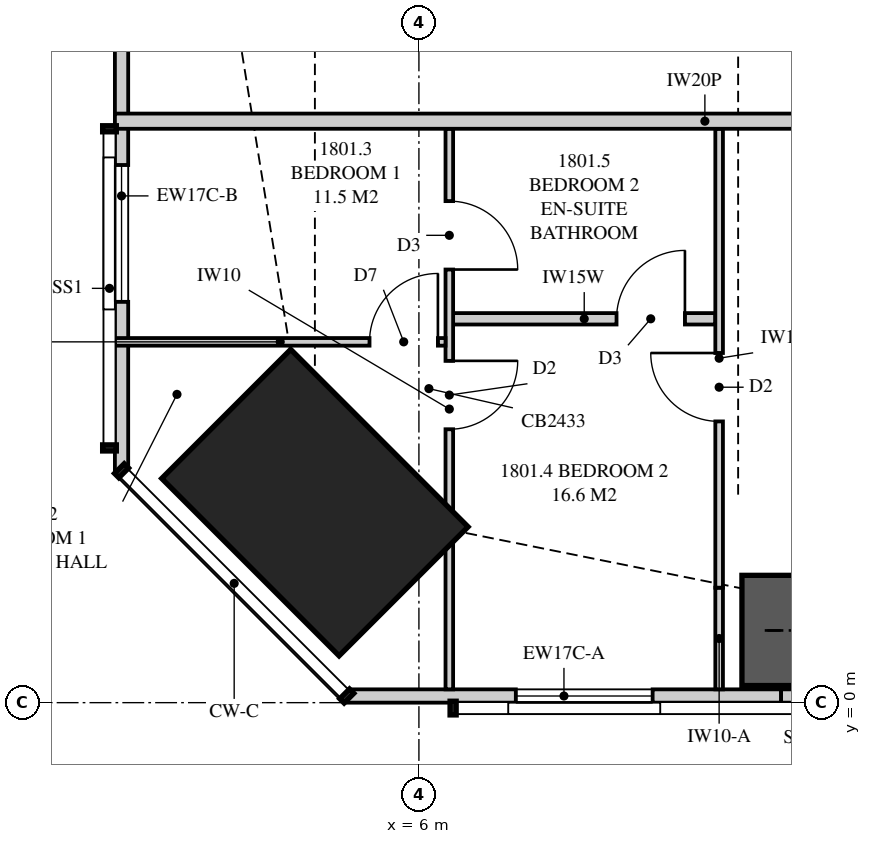
"""IFC4 building model, lengths in metres.
Left out: names, types, materials, properties, quantities, classifications, styles, units other than length and angle.
Written with IfcOpenShell. Run it as: python <this file> out.ifc"""

import sys

from ifc_helpers import new_model, si_unit, direction, frame, frame_2d, origin, origin_2d, place, context, subcontext, project, spatial, polyline, rectangle, hollow_rectangle, outline, extrude, element, fill, save


model = new_model("IFC4")
c1 = context("Model", 3, precision=1e-05, world=origin(), true_north=direction((0.0, 1.0)))
c2 = subcontext(c1, "Body", "Model", "MODEL_VIEW")
j1 = project(units=[si_unit("LENGTHUNIT", "METRE"), si_unit("PLANEANGLEUNIT", "RADIAN")], contexts=[c1])
p1 = place(None, origin())
s1 = spatial("IfcSite", under=j1, at=p1, CompositionType="ELEMENT")
p2 = place(p1, origin())
s2 = spatial("IfcBuilding", under=s1, at=p2, CompositionType="ELEMENT")
p3 = place(p2, frame((0.0, 0.0, 67.9)))
s3 = spatial("IfcBuildingStorey", under=s2, at=p3, CompositionType="ELEMENT", Elevation=67.9)
p4 = place(p3, frame((4.631, 2.631, 0.0), z_axis=(0.0, 0.0, 1.0), x_axis=(0.707106781187, 0.707106781187, 0.0)))
e1 = element("IfcColumn", 1, at=p4, inside=s3, PredefinedType="COLUMN", context=c2, shape_type="SweptSolid", body=[
    extrude(hollow_rectangle(XDim=2.4, YDim=3.3, WallThickness=0.125, at=origin_2d()), origin(), (0.0, 0.0, 1.0), 3.35),
])
p5 = place(p3, frame((5.051, 0.087, 0.0), z_axis=(0.0, 0.0, 1.0), x_axis=(1.0, 0.0, 0.0)))
e2 = element("IfcWall", 2, at=p5, inside=s3, PredefinedType="SOLIDWALL", context=c2, shape_type="SweptSolid", body=[
    extrude(rectangle(XDim=5.714, YDim=0.175, at=frame_2d((2.857, 0.0))), origin(), (0.0, 0.0, 1.0), 3.11),
])
p6 = place(p5, frame((2.224, 0.0, 0.4)))
e3 = element("IfcOpeningElement", 3, at=p6, cuts=e2, PredefinedType="OPENING", context=c2, shape_type="SweptSolid", body=[
    extrude(rectangle(XDim=1.8, YDim=1.7, at=frame_2d((0.9, 0.85))), frame((0.0, 0.097, 0.0), z_axis=(0.0, -1.0, 0.0), x_axis=(1.0, 0.0, 0.0)), (0.0, 0.0, 1.0), 0.195),
])
p7 = place(p3, frame((10.765, 0.087, 0.0), z_axis=(0.0, 0.0, 1.0), x_axis=(1.0, 0.0, 0.0)))
e4 = element("IfcWall", 4, at=p7, inside=s3, PredefinedType="SOLIDWALL", context=c2, shape_type="SweptSolid", body=[
    extrude(rectangle(XDim=6.71, YDim=0.175, at=frame_2d((3.355, 0.0))), origin(), (0.0, 0.0, 1.0), 2.15),
])
p8 = place(p7, frame((5.085, 0.0, 0.4)))
e5 = element("IfcOpeningElement", 5, at=p8, cuts=e4, PredefinedType="OPENING", context=c2, shape_type="SweptSolid", body=[
    extrude(rectangle(XDim=1.2, YDim=1.7, at=frame_2d((0.6, 0.85))), frame((0.0, 0.097, 0.0), z_axis=(0.0, -1.0, 0.0), x_axis=(1.0, 0.0, 0.0)), (0.0, 0.0, 1.0), 0.195),
])
p9 = place(p3, frame((2.087, 10.282, 0.0), z_axis=(0.0, 0.0, 1.0), x_axis=(0.0, -1.0, 0.0)))
e6 = element("IfcWall", 6, at=p9, inside=s3, PredefinedType="SOLIDWALL", context=c2, shape_type="SweptSolid", body=[
    extrude(rectangle(XDim=7.231, YDim=0.175, at=frame_2d((3.616, 0.0))), origin(), (0.0, 0.0, 1.0), 3.11),
])
p10 = place(p9, frame((0.239, 0.0, 0.4)))
e7 = element("IfcOpeningElement", 7, at=p10, cuts=e6, PredefinedType="OPENING", context=c2, shape_type="SweptSolid", body=[
    extrude(rectangle(XDim=1.2, YDim=1.7, at=frame_2d((0.6, 0.85))), frame((0.0, 0.097, 0.0), z_axis=(0.0, -1.0, 0.0), x_axis=(1.0, 0.0, 0.0)), (0.0, 0.0, 1.0), 0.195),
])
p11 = place(p9, frame((3.209, 0.0, 0.4)))
e8 = element("IfcOpeningElement", 8, at=p11, cuts=e6, PredefinedType="OPENING", context=c2, shape_type="SweptSolid", body=[
    extrude(rectangle(XDim=1.8, YDim=1.7, at=frame_2d((0.9, 0.85))), frame((0.0, 0.097, 0.0), z_axis=(0.0, -1.0, 0.0), x_axis=(1.0, 0.0, 0.0)), (0.0, 0.0, 1.0), 0.195),
])
p12 = place(p3, frame((6.4, 0.175, 0.0), z_axis=(0.0, 0.0, 1.0), x_axis=(0.0, 1.0, 0.0)))
e9 = element("IfcWall", 9, at=p12, inside=s3, PredefinedType="PARTITIONING", context=c2, shape_type="SweptSolid", body=[
    extrude(outline(polyline([(0.0, 0.0), (7.375, 0.0), (7.375, 3.11), (3.386, 3.11), (3.386, 2.15), (0.816, 2.15), (0.816, 3.11), (0.0, 3.11), (0.0, 0.0)])), frame((0.0, 0.05, 0.0), z_axis=(0.0, -1.0, 0.0), x_axis=(1.0, 0.0, 0.0)), (0.0, 0.0, 1.0), 0.1),
])
p13 = place(p12, frame((3.422, 0.0, 0.0)))
e10 = element("IfcOpeningElement", 10, at=p13, cuts=e9, PredefinedType="OPENING", context=c2, shape_type="SweptSolid", body=[
    extrude(rectangle(XDim=0.9, YDim=2.1, at=frame_2d((0.45, 1.05))), frame((0.0, 0.06, 0.0), z_axis=(0.0, -1.0, 0.0), x_axis=(1.0, 0.0, 0.0)), (0.0, 0.0, 1.0), 0.12),
])
p14 = place(p12, frame((5.523, 0.0, 0.0)))
e11 = element("IfcOpeningElement", 11, at=p14, cuts=e9, PredefinedType="OPENING", context=c2, shape_type="SweptSolid", body=[
    extrude(rectangle(XDim=0.9, YDim=2.1, at=frame_2d((0.45, 1.05))), frame((0.0, 0.06, 0.0), z_axis=(0.0, -1.0, 0.0), x_axis=(1.0, 0.0, 0.0)), (0.0, 0.0, 1.0), 0.12),
])
p15 = place(p3, frame((9.95, 0.175, 0.0), z_axis=(0.0, 0.0, 1.0), x_axis=(0.0, 1.0, 0.0)))
e12 = element("IfcWall", 12, at=p15, inside=s3, PredefinedType="PARTITIONING", context=c2, shape_type="SweptSolid", body=[
    extrude(outline(polyline([(0.0, 0.0), (1.338, 0.0), (1.338, 2.15), (0.103, 2.15), (0.103, 3.11), (0.0, 3.11), (0.0, 0.0)])), frame((0.0, 0.05, 0.0), z_axis=(0.0, -1.0, 0.0), x_axis=(1.0, 0.0, 0.0)), (0.0, 0.0, 1.0), 0.1),
])
p16 = place(p3, frame((9.95, 1.513, 0.0), z_axis=(0.0, 0.0, 1.0), x_axis=(0.0, 1.0, 0.0)))
e13 = element("IfcWall", 13, at=p16, inside=s3, PredefinedType="PARTITIONING", context=c2, shape_type="SweptSolid", body=[
    extrude(outline(polyline([(0.0, 0.0), (6.037, 0.0), (6.037, 2.51), (1.335, 2.51), (1.335, 2.15), (0.0, 2.15), (0.0, 0.0)])), frame((0.0, 0.05, 0.0), z_axis=(0.0, -1.0, 0.0), x_axis=(1.0, 0.0, 0.0)), (0.0, 0.0, 1.0), 0.1),
])
p17 = place(p16, frame((2.188, 0.0, 0.0)))
e14 = element("IfcOpeningElement", 14, at=p17, cuts=e13, PredefinedType="OPENING", context=c2, shape_type="SweptSolid", body=[
    extrude(rectangle(XDim=0.9, YDim=2.1, at=frame_2d((0.45, 1.05))), frame((0.0, 0.06, 0.0), z_axis=(0.0, -1.0, 0.0), x_axis=(1.0, 0.0, 0.0)), (0.0, 0.0, 1.0), 0.12),
])
p18 = place(p3, frame((2.0, 4.747, 0.0), z_axis=(0.0, 0.0, 1.0), x_axis=(1.0, 0.0, 0.0)))
e15 = element("IfcWall", 15, at=p18, inside=s3, PredefinedType="PARTITIONING", context=c2, shape_type="SweptSolid", body=[
    extrude(outline(polyline([(0.0, 0.0), (4.35, 0.0), (4.35, 3.11), (3.565, 3.11), (3.565, 2.15), (1.012, 2.15), (1.012, 3.11), (0.0, 3.11), (0.0, 0.0)])), frame((0.0, 0.05, 0.0), z_axis=(0.0, -1.0, 0.0), x_axis=(1.0, 0.0, 0.0)), (0.0, 0.0, 1.0), 0.1),
])
p19 = place(p18, frame((3.35, 0.0, 0.0)))
e16 = element("IfcOpeningElement", 16, at=p19, cuts=e15, PredefinedType="OPENING", context=c2, shape_type="SweptSolid", body=[
    extrude(rectangle(XDim=0.9, YDim=2.1, at=frame_2d((0.45, 1.05))), frame((0.0, 0.06, 0.0), z_axis=(0.0, -1.0, 0.0), x_axis=(1.0, 0.0, 0.0)), (0.0, 0.0, 1.0), 0.12),
])
p20 = place(p3, frame((6.45, 5.05, 0.0), z_axis=(0.0, 0.0, 1.0), x_axis=(1.0, 0.0, 0.0)))
e17 = element("IfcWall", 17, at=p20, inside=s3, PredefinedType="PLUMBINGWALL", context=c2, shape_type="SweptSolid", body=[
    extrude(outline(polyline([(0.0, 0.0), (3.45, 0.0), (3.45, 3.11), (3.45, 2.51), (2.465, 2.51), (2.465, 3.11), (0.0, 3.11), (0.0, 0.0)])), frame((0.0, 0.075, 0.0), z_axis=(0.0, -1.0, 0.0), x_axis=(1.0, 0.0, 0.0)), (0.0, 0.0, 1.0), 0.15),
])
p21 = place(p20, frame((2.15, 0.0, 0.0)))
e18 = element("IfcOpeningElement", 18, at=p21, cuts=e17, PredefinedType="OPENING", context=c2, shape_type="SweptSolid", body=[
    extrude(rectangle(XDim=0.9, YDim=2.1, at=frame_2d((0.45, 1.05))), frame((0.0, 0.085, 0.0), z_axis=(0.0, -1.0, 0.0), x_axis=(1.0, 0.0, 0.0)), (0.0, 0.0, 1.0), 0.17),
])
p22 = place(p3, frame((2.0, 7.65, 0.0), z_axis=(0.0, 0.0, 1.0), x_axis=(1.0, 0.0, 0.0)))
e19 = element("IfcWall", 19, at=p22, inside=s3, PredefinedType="PARTITIONING", context=c2, shape_type="SweptSolid", body=[
    extrude(outline(polyline([(0.0, 0.0), (15.525, 0.0), (15.525, 3.11), (11.337, 3.11), (11.337, 2.541), (10.663, 2.541), (10.663, 3.11), (9.51, 3.11), (9.51, 2.51), (6.89, 2.51), (6.89, 3.11), (3.145, 3.11), (3.145, 2.15), (0.49, 2.15), (0.49, 3.11), (0.0, 3.11), (0.0, 0.0)])), frame((0.0, 0.1, 0.0), z_axis=(0.0, -1.0, 0.0), x_axis=(1.0, 0.0, 0.0)), (0.0, 0.0, 1.0), 0.2),
])
p23 = place(p3, frame((10.25, 0.95, 0.0), z_axis=(0.0, 0.0, 1.0), x_axis=(1.0, 0.0, 0.0)))
e20 = element("IfcWall", 20, at=p23, inside=s3, PredefinedType="SHEAR", context=c2, shape_type="SweptSolid", body=[
    extrude(rectangle(XDim=5.5, YDim=1.45, at=frame_2d((2.75, 0.0))), origin(), (0.0, 0.0, 1.0), 3.35),
])
p24 = place(p6, origin())
e21 = element("IfcWindow", 21, at=p24, inside=s3, PartitioningType="SINGLE_PANEL", PredefinedType="WINDOW", context=c2, shape_type="SweptSolid", body=[
    extrude(rectangle(XDim=1.8, YDim=1.7, at=frame_2d((0.9, 0.85))), frame((0.0, 0.03, 0.0), z_axis=(0.0, -1.0, 0.0), x_axis=(1.0, 0.0, 0.0)), (0.0, 0.0, 1.0), 0.06),
])
fill(e3, e21)
p25 = place(p11, origin())
e22 = element("IfcWindow", 22, at=p25, inside=s3, PartitioningType="SINGLE_PANEL", PredefinedType="WINDOW", context=c2, shape_type="SweptSolid", body=[
    extrude(rectangle(XDim=1.8, YDim=1.7, at=frame_2d((0.9, 0.85))), frame((0.0, 0.03, 0.0), z_axis=(0.0, -1.0, 0.0), x_axis=(1.0, 0.0, 0.0)), (0.0, 0.0, 1.0), 0.06),
])
fill(e8, e22)
p26 = place(p19, origin())
e23 = element("IfcDoor", 23, at=p26, inside=s3, OperationType="SINGLE_SWING_RIGHT", PredefinedType="DOOR", context=c2, shape_type="SweptSolid", body=[
    extrude(rectangle(XDim=0.9, YDim=2.1, at=frame_2d((0.45, 1.05))), frame((0.0, 0.025, 0.0), z_axis=(0.0, -1.0, 0.0), x_axis=(1.0, 0.0, 0.0)), (0.0, 0.0, 1.0), 0.05),
])
fill(e16, e23)
p27 = place(p13, frame((0.9, 0.0, 0.0), z_axis=(0.0, 0.0, 1.0), x_axis=(-1.0, 0.0, 0.0)))
e24 = element("IfcDoor", 24, at=p27, inside=s3, OperationType="SINGLE_SWING_LEFT", PredefinedType="DOOR", context=c2, shape_type="SweptSolid", body=[
    extrude(rectangle(XDim=0.9, YDim=2.1, at=frame_2d((0.45, 1.05))), frame((0.0, 0.025, 0.0), z_axis=(0.0, -1.0, 0.0), x_axis=(1.0, 0.0, 0.0)), (0.0, 0.0, 1.0), 0.05),
])
fill(e10, e24)
p28 = place(p17, origin())
e25 = element("IfcDoor", 25, at=p28, inside=s3, OperationType="SINGLE_SWING_RIGHT", PredefinedType="DOOR", context=c2, shape_type="SweptSolid", body=[
    extrude(rectangle(XDim=0.9, YDim=2.1, at=frame_2d((0.45, 1.05))), frame((0.0, 0.025, 0.0), z_axis=(0.0, -1.0, 0.0), x_axis=(1.0, 0.0, 0.0)), (0.0, 0.0, 1.0), 0.05),
])
fill(e14, e25)
p29 = place(p21, origin())
e26 = element("IfcDoor", 26, at=p29, inside=s3, OperationType="SINGLE_SWING_RIGHT", PredefinedType="DOOR", context=c2, shape_type="SweptSolid", body=[
    extrude(rectangle(XDim=0.9, YDim=2.1, at=frame_2d((0.45, 1.05))), frame((0.0, 0.025, 0.0), z_axis=(0.0, -1.0, 0.0), x_axis=(1.0, 0.0, 0.0)), (0.0, 0.0, 1.0), 0.05),
])
fill(e18, e26)
p30 = place(p14, frame((0.9, 0.0, 0.0), z_axis=(0.0, 0.0, 1.0), x_axis=(-1.0, 0.0, 0.0)))
e27 = element("IfcDoor", 27, at=p30, inside=s3, OperationType="SINGLE_SWING_RIGHT", PredefinedType="DOOR", context=c2, shape_type="SweptSolid", body=[
    extrude(rectangle(XDim=0.9, YDim=2.1, at=frame_2d((0.45, 1.05))), frame((0.0, 0.025, 0.0), z_axis=(0.0, -1.0, 0.0), x_axis=(1.0, 0.0, 0.0)), (0.0, 0.0, 1.0), 0.05),
])
fill(e11, e27)
save(model, sys.argv[1])
